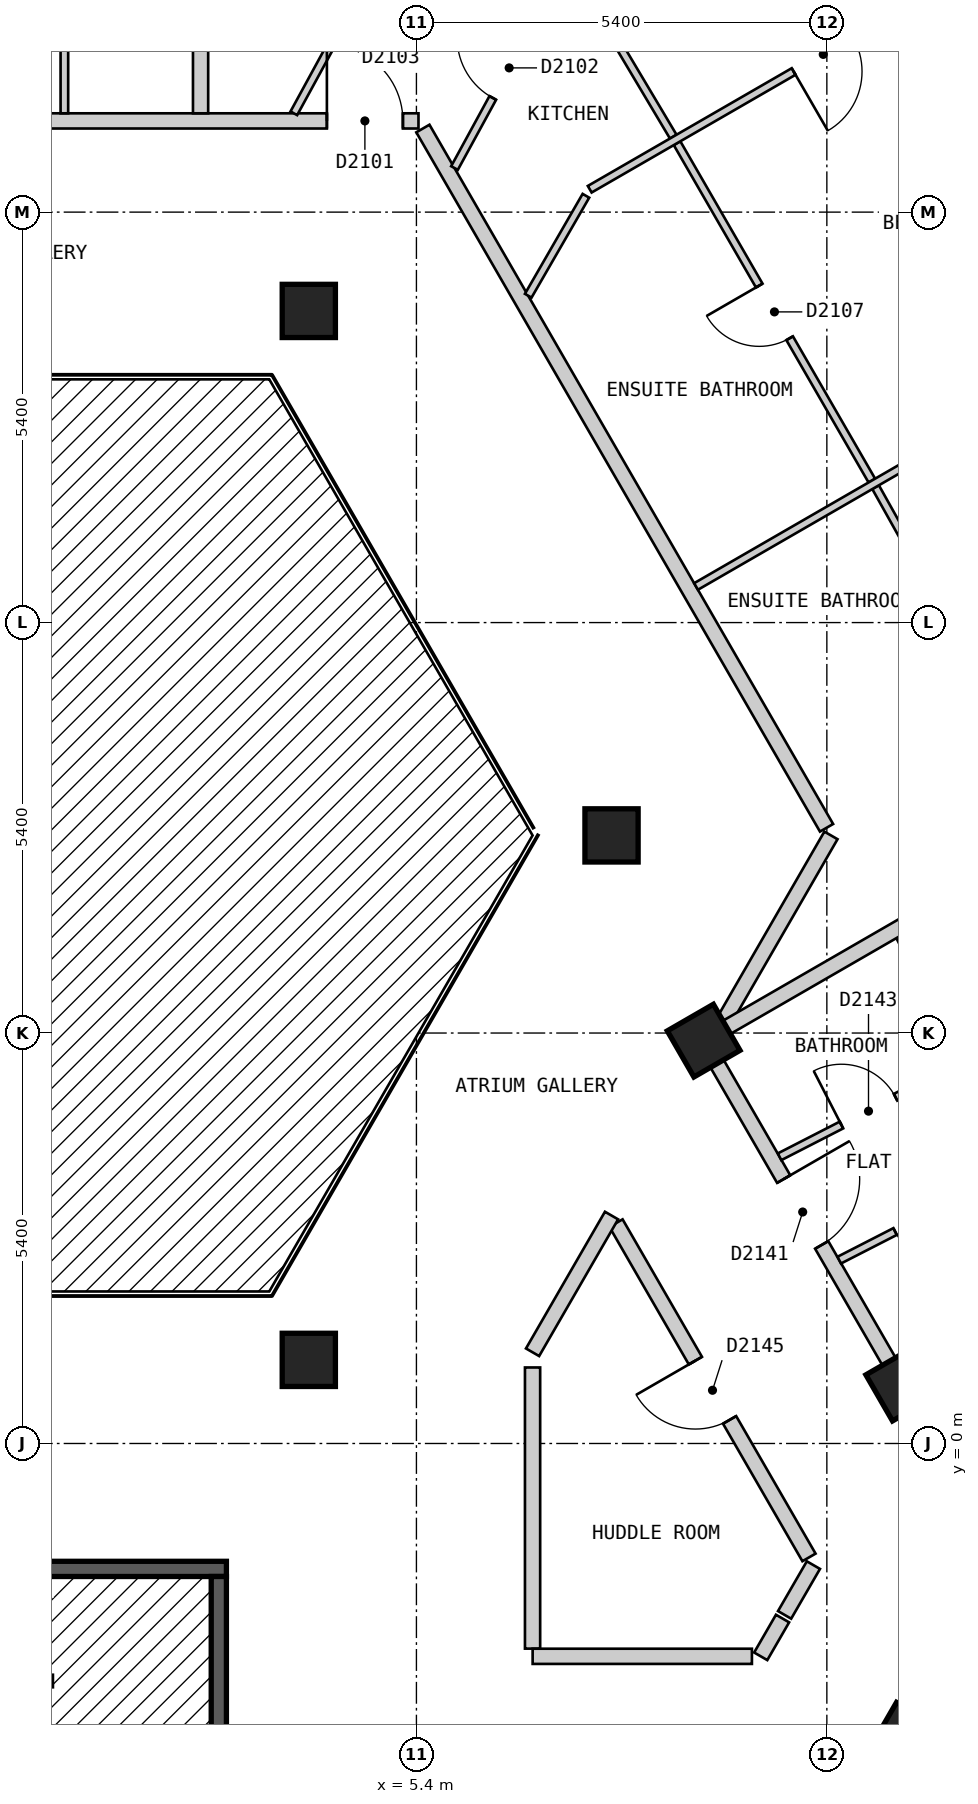
"""IFC4 building model, lengths in metres.
Left out: names, types, materials, properties, quantities, classifications, styles, units other than length and angle.
Written with IfcOpenShell. Run it as: python <this file> out.ifc"""

import sys

from ifc_helpers import new_model, si_unit, direction, frame, frame_2d, origin, origin_2d, place, context, subcontext, project, spatial, rectangle, extrude, element, fill, save


model = new_model("IFC4")
c1 = context("Model", 3, precision=1e-05, world=origin(), true_north=direction((0.0, 1.0)))
c2 = subcontext(c1, "Body", "Model", "MODEL_VIEW")
j1 = project(units=[si_unit("LENGTHUNIT", "METRE"), si_unit("PLANEANGLEUNIT", "RADIAN")], contexts=[c1])
p1 = place(None, origin())
s1 = spatial("IfcSite", under=j1, at=p1, CompositionType="ELEMENT")
p2 = place(p1, origin())
s2 = spatial("IfcBuilding", under=s1, at=p2, CompositionType="ELEMENT")
p3 = place(p2, frame((0.0, 0.0, 205.8)))
s3 = spatial("IfcBuildingStorey", under=s2, at=p3, CompositionType="ELEMENT", Elevation=205.8)
for number, where, z_axis, x_axis in (
    (1, (11.845, -3.884, 0.0), (0.0, 0.0, 1.0), (0.5, 0.866, 0.0)),
    (2, (11.792, 0.775, 0.0), (0.0, 0.0, 1.0), (-0.5, 0.866, 0.0)),
    (3, (3.984, 1.1, 0.0), (0.0, 0.0, 1.0), (1.0, 0.0, 0.0)),
    (4, (9.179, 5.3, 0.0), (0.0, 0.0, 1.0), (-0.5, 0.866, 0.0)),
    (5, (7.967, 8.0, 0.0), (0.0, 0.0, 1.0), (1.0, 0.0, 0.0)),
    (6, (3.984, 14.9, 0.0), (0.0, 0.0, 1.0), (1.0, 0.0, 0.0)),
):
    element("IfcColumn", number, at=place(p3, frame(where, z_axis=z_axis, x_axis=x_axis)), inside=s3, PredefinedType="COLUMN", context=c2, shape_type="SweptSolid", body=[
        extrude(rectangle(XDim=0.7, YDim=0.7, at=origin_2d()), origin(), (0.0, 0.0, 1.0), 3.0),
    ])
p4 = place(p3, frame((-2.9, -1.65, 0.0), z_axis=(0.0, 0.0, 1.0), x_axis=(1.0, 0.0, 0.0)))
e7 = element("IfcWall", 7, at=p4, inside=s3, PredefinedType="SOLIDWALL", context=c2, shape_type="SweptSolid", body=[
    extrude(rectangle(XDim=5.8, YDim=0.2, at=frame_2d((2.9, 0.0))), origin(), (0.0, 0.0, 1.0), 2.7),
])
p5 = place(p4, frame((0.3, 0.0, 0.0)))
e8 = element("IfcOpeningElement", 8, at=p5, cuts=e7, PredefinedType="OPENING", context=c2, shape_type="SweptSolid", body=[
    extrude(rectangle(XDim=1.2, YDim=2.1, at=frame_2d((0.6, 1.05))), frame((0.0, 0.11, 0.0), z_axis=(0.0, -1.0, 0.0), x_axis=(1.0, 0.0, 0.0)), (0.0, 0.0, 1.0), 0.22),
])
p6 = place(p3, frame((2.8, -4.5, 0.0), z_axis=(0.0, 0.0, 1.0), x_axis=(0.0, 1.0, 0.0)))
e9 = element("IfcWall", 9, at=p6, inside=s3, PredefinedType="SOLIDWALL", context=c2, shape_type="SweptSolid", body=[
    extrude(rectangle(XDim=2.75, YDim=0.2, at=frame_2d((1.375, 0.0))), origin(), (0.0, 0.0, 1.0), 2.7),
])
p7 = place(p3, frame((8.026, 2.899, 0.0), z_axis=(0.0, 0.0, 1.0), x_axis=(0.499986018985, -0.866033475577, 0.0)))
e10 = element("IfcWall", 10, at=p7, inside=s3, PredefinedType="PARTITIONING", context=c2, shape_type="SweptSolid", body=[
    extrude(rectangle(XDim=5.078, YDim=0.2, at=frame_2d((2.539, 0.0))), origin(), (0.0, 0.0, 1.0), 2.7),
])
p8 = place(p7, frame((2.089, 0.0, 0.0)))
e11 = element("IfcOpeningElement", 11, at=p8, cuts=e10, PredefinedType="OPENING", context=c2, shape_type="SweptSolid", body=[
    extrude(rectangle(XDim=0.9, YDim=2.1, at=frame_2d((0.45, 1.05))), frame((0.0, 0.11, 0.0), z_axis=(0.0, -1.0, 0.0), x_axis=(1.0, 0.0, 0.0)), (0.0, 0.0, 1.0), 0.22),
])
p9 = place(p3, frame((9.238, 5.2, 0.0), z_axis=(0.0, 0.0, 1.0), x_axis=(0.500025705601, -0.86601056214, 0.0)))
e12 = element("IfcWall", 12, at=p9, inside=s3, PredefinedType="PARTITIONING", context=c2, shape_type="SweptSolid", body=[
    extrude(rectangle(XDim=7.735, YDim=0.2, at=frame_2d((3.868, 0.0))), origin(), (0.0, 0.0, 1.0), 2.7),
])
p10 = place(p9, frame((6.705, 0.0, 0.0)))
e13 = element("IfcOpeningElement", 13, at=p10, cuts=e12, PredefinedType="OPENING", context=c2, shape_type="SweptSolid", body=[
    extrude(rectangle(XDim=1.0, YDim=2.1, at=frame_2d((0.5, 1.05))), frame((0.0, 0.11, 0.0), z_axis=(0.0, -1.0, 0.0), x_axis=(1.0, 0.0, 0.0)), (0.0, 0.0, 1.0), 0.22),
])
p11 = place(p9, frame((1.988, 0.0, 0.0)))
e14 = element("IfcOpeningElement", 14, at=p11, cuts=e12, PredefinedType="OPENING", context=c2, shape_type="SweptSolid", body=[
    extrude(rectangle(XDim=1.0, YDim=2.1, at=frame_2d((0.5, 1.05))), frame((0.0, 0.11, 0.0), z_axis=(0.0, -1.0, 0.0), x_axis=(1.0, 0.0, 0.0)), (0.0, 0.0, 1.0), 0.22),
])
p12 = place(p3, frame((5.485, 17.3, 0.0), z_axis=(0.0, 0.0, 1.0), x_axis=(0.499943285704, -0.866058145322, 0.0)))
e15 = element("IfcWall", 15, at=p12, inside=s3, PredefinedType="PARTITIONING", context=c2, shape_type="SweptSolid", body=[
    extrude(rectangle(XDim=10.623, YDim=0.2, at=frame_2d((5.312, 0.0))), origin(), (0.0, 0.0, 1.0), 2.7),
])
p13 = place(p3, frame((6.928, 1.0, 0.0), z_axis=(0.0, 0.0, 1.0), x_axis=(0.0, -1.0, 0.0)))
e16 = element("IfcWall", 16, at=p13, inside=s3, PredefinedType="PARTITIONING", context=c2, shape_type="SweptSolid", body=[
    extrude(rectangle(XDim=3.699, YDim=0.2, at=frame_2d((1.85, 0.0))), origin(), (0.0, 0.0, 1.0), 2.7),
])
p14 = place(p3, frame((6.929, -2.8, 0.0), z_axis=(0.0, 0.0, 1.0), x_axis=(1.0, 0.0, 0.0)))
e17 = element("IfcWall", 17, at=p14, inside=s3, PredefinedType="PARTITIONING", context=c2, shape_type="SweptSolid", body=[
    extrude(rectangle(XDim=2.885, YDim=0.2, at=frame_2d((1.442, 0.0))), origin(), (0.0, 0.0, 1.0), 2.7),
])
p15 = place(p3, frame((-5.312, 17.4, 0.0), z_axis=(0.0, 0.0, 1.0), x_axis=(1.0, 0.0, 0.0)))
e18 = element("IfcWall", 18, at=p15, inside=s3, PredefinedType="PARTITIONING", context=c2, shape_type="SweptSolid", body=[
    extrude(rectangle(XDim=10.739, YDim=0.2, at=frame_2d((5.37, 0.0))), origin(), (0.0, 0.0, 1.0), 2.7),
])
p16 = place(p15, frame((9.534, 0.0, 0.0)))
e19 = element("IfcOpeningElement", 19, at=p16, cuts=e18, PredefinedType="OPENING", context=c2, shape_type="SweptSolid", body=[
    extrude(rectangle(XDim=1.0, YDim=2.1, at=frame_2d((0.5, 1.05))), frame((0.0, 0.11, 0.0), z_axis=(0.0, -1.0, 0.0), x_axis=(1.0, 0.0, 0.0)), (0.0, 0.0, 1.0), 0.22),
])
p17 = place(p15, frame((4.812, 0.0, 0.0)))
e20 = element("IfcOpeningElement", 20, at=p17, cuts=e18, PredefinedType="OPENING", context=c2, shape_type="SweptSolid", body=[
    extrude(rectangle(XDim=1.0, YDim=2.1, at=frame_2d((0.5, 1.05))), frame((0.0, 0.11, 0.0), z_axis=(0.0, -1.0, 0.0), x_axis=(1.0, 0.0, 0.0)), (0.0, 0.0, 1.0), 0.22),
])
p18 = place(p3, frame((6.928, 1.2, 0.0), z_axis=(0.0, 0.0, 1.0), x_axis=(0.500132712588, 0.865948768577, 0.0)))
e21 = element("IfcWall", 21, at=p18, inside=s3, PredefinedType="PARTITIONING", context=c2, shape_type="SweptSolid", body=[
    extrude(rectangle(XDim=2.078, YDim=0.2, at=frame_2d((1.039, 0.0))), origin(), (0.0, 0.0, 1.0), 2.7),
])
p19 = place(p3, frame((9.454, 5.574, 0.0), z_axis=(0.0, 0.0, 1.0), x_axis=(0.499795394297, 0.86614350072, 0.0)))
e22 = element("IfcWall", 22, at=p19, inside=s3, PredefinedType="PARTITIONING", context=c2, shape_type="SweptSolid", body=[
    extrude(rectangle(XDim=2.801, YDim=0.2, at=frame_2d((1.4, 0.0))), origin(), (0.0, 0.0, 1.0), 2.7),
])
p20 = place(p3, frame((9.93, -2.8, 0.0), z_axis=(0.0, 0.0, 1.0), x_axis=(0.500164219654, 0.865930570761, 0.0)))
e23 = element("IfcWall", 23, at=p20, inside=s3, PredefinedType="PARTITIONING", context=c2, shape_type="SweptSolid", body=[
    extrude(rectangle(XDim=0.574, YDim=0.2, at=frame_2d((0.287, 0.0))), origin(), (0.0, 0.0, 1.0), 2.7),
])
p21 = place(p3, frame((10.244, -2.255, 0.0), z_axis=(0.0, 0.0, 1.0), x_axis=(0.50109986513, 0.865389464442, 0.0)))
e24 = element("IfcWall", 24, at=p21, inside=s3, PredefinedType="PARTITIONING", context=c2, shape_type="SweptSolid", body=[
    extrude(rectangle(XDim=0.757, YDim=0.2, at=frame_2d((0.378, 0.0))), origin(), (0.0, 0.0, 1.0), 2.7),
])
p22 = place(p3, frame((7.414, 19.484, 0.0), z_axis=(0.0, 0.0, 1.0), x_axis=(0.511881371655, -0.859056145634, 0.0)))
e25 = element("IfcWall", 25, at=p22, inside=s3, PredefinedType="PARTITIONING", context=c2, shape_type="SweptSolid", body=[
    extrude(rectangle(XDim=2.667, YDim=0.1, at=frame_2d((1.333, 0.0))), origin(), (0.0, 0.0, 1.0), 2.7),
])
p23 = place(p3, frame((8.829, 17.107, 0.0), z_axis=(0.0, 0.0, 1.0), x_axis=(0.500022055211, -0.866012669828, 0.0)))
e26 = element("IfcWall", 26, at=p23, inside=s3, PredefinedType="PARTITIONING", context=c2, shape_type="SweptSolid", body=[
    extrude(rectangle(XDim=5.126, YDim=0.1, at=frame_2d((2.563, 0.0))), origin(), (0.0, 0.0, 1.0), 2.7),
])
p24 = place(p23, frame((2.163, 0.0, 0.0)))
e27 = element("IfcOpeningElement", 27, at=p24, cuts=e26, PredefinedType="OPENING", context=c2, shape_type="SweptSolid", body=[
    extrude(rectangle(XDim=0.8, YDim=2.1, at=frame_2d((0.4, 1.05))), frame((0.0, 0.06, 0.0), z_axis=(0.0, -1.0, 0.0), x_axis=(1.0, 0.0, 0.0)), (0.0, 0.0, 1.0), 0.12),
])
p25 = place(p3, frame((11.441, 12.582, 0.0), z_axis=(0.0, 0.0, 1.0), x_axis=(0.488568218554, -0.872525699231, 0.0)))
e28 = element("IfcWall", 28, at=p25, inside=s3, PredefinedType="PARTITIONING", context=c2, shape_type="SweptSolid", body=[
    extrude(rectangle(XDim=5.076, YDim=0.1, at=frame_2d((2.538, 0.0))), origin(), (0.0, 0.0, 1.0), 2.7),
])
p26 = place(p25, frame((2.163, 0.0, 0.0)))
e29 = element("IfcOpeningElement", 29, at=p26, cuts=e28, PredefinedType="OPENING", context=c2, shape_type="SweptSolid", body=[
    extrude(rectangle(XDim=0.8, YDim=2.1, at=frame_2d((0.4, 1.05))), frame((0.0, 0.06, 0.0), z_axis=(0.0, -1.0, 0.0), x_axis=(1.0, 0.0, 0.0)), (0.0, 0.0, 1.0), 0.12),
])
p27 = place(p3, frame((11.772, 6.646, 0.0), z_axis=(0.0, 0.0, 1.0), x_axis=(0.456175983405, -0.889889584254, 0.0)))
e30 = element("IfcWall", 30, at=p27, inside=s3, PredefinedType="PARTITIONING", context=c2, shape_type="SweptSolid", body=[
    extrude(rectangle(XDim=3.348, YDim=0.1, at=frame_2d((1.674, 0.0))), origin(), (0.0, 0.0, 1.0), 2.7),
])
p28 = place(p3, frame((6.871, 15.1, 0.0), z_axis=(0.0, 0.0, 1.0), x_axis=(0.499805980977, 0.866137391745, 0.0)))
e31 = element("IfcWall", 31, at=p28, inside=s3, PredefinedType="PARTITIONING", context=c2, shape_type="SweptSolid", body=[
    extrude(rectangle(XDim=1.518, YDim=0.1, at=frame_2d((0.759, 0.0))), origin(), (0.0, 0.0, 1.0), 2.7),
])
p29 = place(p3, frame((3.787, 17.5, 0.0), z_axis=(0.0, 0.0, 1.0), x_axis=(0.479146828267, 0.877734764585, 0.0)))
e32 = element("IfcWall", 32, at=p29, inside=s3, PredefinedType="PARTITIONING", context=c2, shape_type="SweptSolid", body=[
    extrude(rectangle(XDim=3.076, YDim=0.1, at=frame_2d((1.538, 0.0))), origin(), (0.0, 0.0, 1.0), 2.7),
])
p30 = place(p29, frame((1.081, 0.0, 0.0)))
e33 = element("IfcOpeningElement", 33, at=p30, cuts=e32, PredefinedType="OPENING", context=c2, shape_type="SweptSolid", body=[
    extrude(rectangle(XDim=0.8, YDim=2.1, at=frame_2d((0.4, 1.05))), frame((0.0, 0.06, 0.0), z_axis=(0.0, -1.0, 0.0), x_axis=(1.0, 0.0, 0.0)), (0.0, 0.0, 1.0), 0.12),
])
p31 = place(p3, frame((5.901, 16.78, 0.0), z_axis=(0.0, 0.0, 1.0), x_axis=(0.479148317257, 0.877733951759, 0.0)))
e34 = element("IfcWall", 34, at=p31, inside=s3, PredefinedType="PARTITIONING", context=c2, shape_type="SweptSolid", body=[
    extrude(rectangle(XDim=3.118, YDim=0.1, at=frame_2d((1.559, 0.0))), origin(), (0.0, 0.0, 1.0), 2.7),
])
p32 = place(p31, frame((1.051, 0.0, 0.0)))
e35 = element("IfcOpeningElement", 35, at=p32, cuts=e34, PredefinedType="OPENING", context=c2, shape_type="SweptSolid", body=[
    extrude(rectangle(XDim=0.9, YDim=2.1, at=frame_2d((0.45, 1.05))), frame((0.0, 0.06, 0.0), z_axis=(0.0, -1.0, 0.0), x_axis=(1.0, 0.0, 0.0)), (0.0, 0.0, 1.0), 0.12),
])
p33 = place(p3, frame((0.768, 17.5, 0.0), z_axis=(0.0, 0.0, 1.0), x_axis=(0.0, 1.0, 0.0)))
e36 = element("IfcWall", 36, at=p33, inside=s3, PredefinedType="PARTITIONING", context=c2, shape_type="SweptSolid", body=[
    extrude(rectangle(XDim=2.51, YDim=0.1, at=frame_2d((1.255, 0.0))), origin(), (0.0, 0.0, 1.0), 2.7),
])
p34 = place(p33, frame((0.83, 0.0, 0.0)))
e37 = element("IfcOpeningElement", 37, at=p34, cuts=e36, PredefinedType="OPENING", context=c2, shape_type="SweptSolid", body=[
    extrude(rectangle(XDim=0.8, YDim=2.1, at=frame_2d((0.4, 1.05))), frame((0.0, 0.06, 0.0), z_axis=(0.0, -1.0, 0.0), x_axis=(1.0, 0.0, 0.0)), (0.0, 0.0, 1.0), 0.12),
])
p35 = place(p3, frame((10.178, 3.772, 0.0), z_axis=(0.0, 0.0, 1.0), x_axis=(0.889732071959, 0.456483121405, 0.0)))
e38 = element("IfcWall", 38, at=p35, inside=s3, PredefinedType="PARTITIONING", context=c2, shape_type="SweptSolid", body=[
    extrude(rectangle(XDim=2.679, YDim=0.1, at=frame_2d((1.34, 0.0))), origin(), (0.0, 0.0, 1.0), 2.7),
])
p36 = place(p35, frame((0.915, 0.0, 0.0)))
e39 = element("IfcOpeningElement", 39, at=p36, cuts=e38, PredefinedType="OPENING", context=c2, shape_type="SweptSolid", body=[
    extrude(rectangle(XDim=0.8, YDim=2.1, at=frame_2d((0.4, 1.05))), frame((0.0, 0.06, 0.0), z_axis=(0.0, -1.0, 0.0), x_axis=(1.0, 0.0, 0.0)), (0.0, 0.0, 1.0), 0.12),
])
p37 = place(p3, frame((10.963, 2.412, 0.0), z_axis=(0.0, 0.0, 1.0), x_axis=(0.889943997558, 0.456069820543, 0.0)))
e40 = element("IfcWall", 40, at=p37, inside=s3, PredefinedType="PARTITIONING", context=c2, shape_type="SweptSolid", body=[
    extrude(rectangle(XDim=2.651, YDim=0.1, at=frame_2d((1.325, 0.0))), origin(), (0.0, 0.0, 1.0), 2.7),
])
p38 = place(p37, frame((0.826, 0.0, 0.0)))
e41 = element("IfcOpeningElement", 41, at=p38, cuts=e40, PredefinedType="OPENING", context=c2, shape_type="SweptSolid", body=[
    extrude(rectangle(XDim=0.9, YDim=2.1, at=frame_2d((0.45, 1.05))), frame((0.0, 0.06, 0.0), z_axis=(0.0, -1.0, 0.0), x_axis=(1.0, 0.0, 0.0)), (0.0, 0.0, 1.0), 0.12),
])
p39 = place(p3, frame((9.079, 11.275, 0.0), z_axis=(0.0, 0.0, 1.0), x_axis=(0.866001485781, 0.500041424909, 0.0)))
e42 = element("IfcWall", 42, at=p39, inside=s3, PredefinedType="PARTITIONING", context=c2, shape_type="SweptSolid", body=[
    extrude(rectangle(XDim=7.2, YDim=0.1, at=frame_2d((3.6, 0.0))), origin(), (0.0, 0.0, 1.0), 2.7),
])
p40 = place(p39, frame((4.5, 0.0, 0.0)))
e43 = element("IfcOpeningElement", 43, at=p40, cuts=e42, PredefinedType="OPENING", context=c2, shape_type="SweptSolid", body=[
    extrude(rectangle(XDim=0.9, YDim=2.1, at=frame_2d((0.45, 1.05))), frame((0.0, 0.06, 0.0), z_axis=(0.0, -1.0, 0.0), x_axis=(1.0, 0.0, 0.0)), (0.0, 0.0, 1.0), 0.12),
])
p41 = place(p3, frame((7.68, 16.501, 0.0), z_axis=(0.0, 0.0, 1.0), x_axis=(0.86602149507, 0.500006770031, 0.0)))
e44 = element("IfcWall", 44, at=p41, inside=s3, PredefinedType="PARTITIONING", context=c2, shape_type="SweptSolid", body=[
    extrude(rectangle(XDim=5.798, YDim=0.1, at=frame_2d((2.899, 0.0))), origin(), (0.0, 0.0, 1.0), 2.7),
])
p42 = place(p41, frame((3.098, 0.0, 0.0)))
e45 = element("IfcOpeningElement", 45, at=p42, cuts=e44, PredefinedType="OPENING", context=c2, shape_type="SweptSolid", body=[
    extrude(rectangle(XDim=0.9, YDim=2.1, at=frame_2d((0.45, 1.05))), frame((0.0, 0.06, 0.0), z_axis=(0.0, -1.0, 0.0), x_axis=(1.0, 0.0, 0.0)), (0.0, 0.0, 1.0), 0.12),
])
p43 = place(p3, frame((2.56, 20.08, 0.0), z_axis=(0.0, 0.0, 1.0), x_axis=(0.0, -1.0, 0.0)))
e46 = element("IfcWall", 46, at=p43, inside=s3, PredefinedType="PARTITIONING", context=c2, shape_type="SweptSolid", body=[
    extrude(rectangle(XDim=2.58, YDim=0.2, at=frame_2d((1.29, 0.0))), origin(), (0.0, 0.0, 1.0), 2.7),
])
p44 = place(p3, frame((9.354, 5.401, 0.0), z_axis=(0.0, 0.0, 1.0), x_axis=(0.866018411306, 0.500012111133, 0.0)))
e47 = element("IfcWall", 47, at=p44, inside=s3, PredefinedType="PARTITIONING", context=c2, shape_type="SweptSolid", body=[
    extrude(rectangle(XDim=9.898, YDim=0.2, at=frame_2d((4.949, 0.0))), origin(), (0.0, 0.0, 1.0), 2.7),
])
p45 = place(p16, origin())
e48 = element("IfcDoor", 48, at=p45, inside=s3, OperationType="SINGLE_SWING_LEFT", PredefinedType="DOOR", context=c2, shape_type="SweptSolid", body=[
    extrude(rectangle(XDim=1.0, YDim=2.1, at=frame_2d((0.5, 1.05))), frame((0.0, 0.025, 0.0), z_axis=(0.0, -1.0, 0.0), x_axis=(1.0, 0.0, 0.0)), (0.0, 0.0, 1.0), 0.05),
])
fill(e19, e48)
p46 = place(p32, origin())
e49 = element("IfcDoor", 49, at=p46, inside=s3, OperationType="SINGLE_SWING_RIGHT", PredefinedType="DOOR", context=c2, shape_type="SweptSolid", body=[
    extrude(rectangle(XDim=0.9, YDim=2.1, at=frame_2d((0.45, 1.05))), frame((0.0, 0.025, 0.0), z_axis=(0.0, -1.0, 0.0), x_axis=(1.0, 0.0, 0.0)), (0.0, 0.0, 1.0), 0.05),
])
fill(e35, e49)
p47 = place(p42, origin())
e50 = element("IfcDoor", 50, at=p47, inside=s3, OperationType="SINGLE_SWING_LEFT", PredefinedType="DOOR", context=c2, shape_type="SweptSolid", body=[
    extrude(rectangle(XDim=0.9, YDim=2.1, at=frame_2d((0.45, 1.05))), frame((0.0, 0.025, 0.0), z_axis=(0.0, -1.0, 0.0), x_axis=(1.0, 0.0, 0.0)), (0.0, 0.0, 1.0), 0.05),
])
fill(e45, e50)
p48 = place(p24, origin())
e51 = element("IfcDoor", 51, at=p48, inside=s3, OperationType="SINGLE_SWING_LEFT", PredefinedType="DOOR", context=c2, shape_type="SweptSolid", body=[
    extrude(rectangle(XDim=0.8, YDim=2.1, at=frame_2d((0.4, 1.05))), frame((0.0, 0.025, 0.0), z_axis=(0.0, -1.0, 0.0), x_axis=(1.0, 0.0, 0.0)), (0.0, 0.0, 1.0), 0.05),
])
fill(e27, e51)
p49 = place(p11, origin())
e52 = element("IfcDoor", 52, at=p49, inside=s3, OperationType="SINGLE_SWING_LEFT", PredefinedType="DOOR", context=c2, shape_type="SweptSolid", body=[
    extrude(rectangle(XDim=1.0, YDim=2.1, at=frame_2d((0.5, 1.05))), frame((0.0, 0.025, 0.0), z_axis=(0.0, -1.0, 0.0), x_axis=(1.0, 0.0, 0.0)), (0.0, 0.0, 1.0), 0.05),
])
fill(e14, e52)
p50 = place(p38, origin())
e53 = element("IfcDoor", 53, at=p50, inside=s3, OperationType="SINGLE_SWING_RIGHT", PredefinedType="DOOR", context=c2, shape_type="SweptSolid", body=[
    extrude(rectangle(XDim=0.9, YDim=2.1, at=frame_2d((0.45, 1.05))), frame((0.0, 0.025, 0.0), z_axis=(0.0, -1.0, 0.0), x_axis=(1.0, 0.0, 0.0)), (0.0, 0.0, 1.0), 0.05),
])
fill(e41, e53)
p51 = place(p36, origin())
e54 = element("IfcDoor", 54, at=p51, inside=s3, OperationType="SINGLE_SWING_LEFT", PredefinedType="DOOR", context=c2, shape_type="SweptSolid", body=[
    extrude(rectangle(XDim=0.8, YDim=2.1, at=frame_2d((0.4, 1.05))), frame((0.0, 0.025, 0.0), z_axis=(0.0, -1.0, 0.0), x_axis=(1.0, 0.0, 0.0)), (0.0, 0.0, 1.0), 0.05),
])
fill(e39, e54)
p52 = place(p8, origin())
e55 = element("IfcDoor", 55, at=p52, inside=s3, OperationType="SINGLE_SWING_LEFT", PredefinedType="DOOR", context=c2, shape_type="SweptSolid", body=[
    extrude(rectangle(XDim=0.9, YDim=2.1, at=frame_2d((0.45, 1.05))), frame((0.0, 0.025, 0.0), z_axis=(0.0, -1.0, 0.0), x_axis=(1.0, 0.0, 0.0)), (0.0, 0.0, 1.0), 0.05),
])
fill(e11, e55)
save(model, sys.argv[1])
